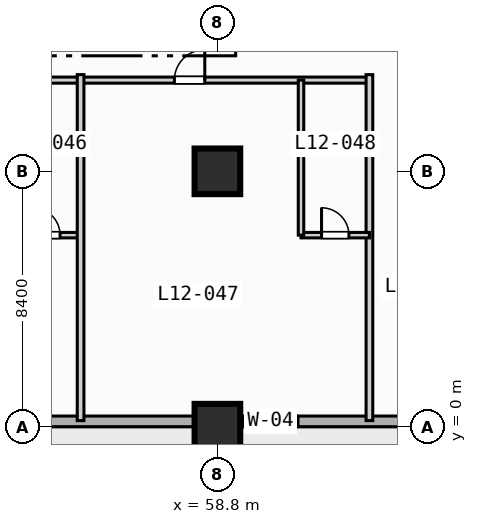
"""IFC4 building model, lengths in metres.
Left out: names, types, materials, properties, quantities, classifications, styles, units other than length and angle.
Written with IfcOpenShell. Run it as: python <this file> out.ifc"""

import sys

from ifc_helpers import new_model, si_unit, direction, frame, frame_2d, origin, origin_2d, place, context, subcontext, project, spatial, rectangle, extrude, element, fill, save


model = new_model("IFC4")
c1 = context("Model", 3, precision=1e-05, world=origin(), true_north=direction((0.0, 1.0)))
c2 = subcontext(c1, "Body", "Model", "MODEL_VIEW")
j1 = project(units=[si_unit("LENGTHUNIT", "METRE"), si_unit("PLANEANGLEUNIT", "RADIAN")], contexts=[c1])
p1 = place(None, origin())
s1 = spatial("IfcSite", under=j1, at=p1, CompositionType="ELEMENT")
p2 = place(p1, origin())
s2 = spatial("IfcBuilding", under=s1, at=p2, CompositionType="ELEMENT")
p3 = place(p2, frame((0.0, 0.0, 54.8)))
s3 = spatial("IfcBuildingStorey", under=s2, at=p3, CompositionType="ELEMENT", Elevation=54.8)
for number, where, z_axis, x_axis in (
    (1, (58.8, 0.0, 0.0), (0.0, 0.0, 1.0), (1.0, 0.0, 0.0)),
    (2, (58.8, 8.4, 0.0), (0.0, 0.0, 1.0), (1.0, 0.0, 0.0)),
):
    element("IfcColumn", number, at=place(p3, frame(where, z_axis=z_axis, x_axis=x_axis)), inside=s3, PredefinedType="COLUMN", context=c2, shape_type="SweptSolid", body=[
        extrude(rectangle(XDim=1.5, YDim=1.5, at=origin_2d()), origin(), (0.0, 0.0, 1.0), 3.8),
    ])
p4 = place(p3, frame((89.225, 0.175, 0.0), z_axis=(0.0, 0.0, 1.0), x_axis=(-1.0, 0.0, 0.0)))
e3 = element("IfcWall", 3, at=p4, inside=s3, PredefinedType="STANDARD", context=c2, shape_type="SweptSolid", body=[
    extrude(rectangle(XDim=86.05, YDim=0.35, at=frame_2d((43.025, 0.0))), origin(), (0.0, 0.0, 1.0), 3.55),
])
p5 = place(p4, frame((69.025, 0.0, 0.0)))
e4 = element("IfcOpeningElement", 4, at=p5, cuts=e3, PredefinedType="OPENING", context=c2, shape_type="SweptSolid", body=[
    extrude(rectangle(XDim=1.4, YDim=2.2, at=frame_2d((0.7, 1.1))), frame((0.0, 0.185, 0.0), z_axis=(0.0, -1.0, 0.0), x_axis=(1.0, 0.0, 0.0)), (0.0, 0.0, 1.0), 0.37),
])
p6 = place(p4, frame((58.725, 0.0, 0.85)))
e5 = element("IfcOpeningElement", 5, at=p6, cuts=e3, PredefinedType="OPENING", context=c2, shape_type="SweptSolid", body=[
    extrude(rectangle(XDim=2.2, YDim=1.8, at=frame_2d((1.1, 0.9))), frame((0.0, 0.185, 0.0), z_axis=(0.0, -1.0, 0.0), x_axis=(1.0, 0.0, 0.0)), (0.0, 0.0, 1.0), 0.37),
])
p7 = place(p4, frame((50.325, 0.0, 0.85)))
e6 = element("IfcOpeningElement", 6, at=p7, cuts=e3, PredefinedType="OPENING", context=c2, shape_type="SweptSolid", body=[
    extrude(rectangle(XDim=2.2, YDim=1.8, at=frame_2d((1.1, 0.9))), frame((0.0, 0.185, 0.0), z_axis=(0.0, -1.0, 0.0), x_axis=(1.0, 0.0, 0.0)), (0.0, 0.0, 1.0), 0.37),
])
p8 = place(p4, frame((41.925, 0.0, 0.85)))
e7 = element("IfcOpeningElement", 7, at=p8, cuts=e3, PredefinedType="OPENING", context=c2, shape_type="SweptSolid", body=[
    extrude(rectangle(XDim=2.2, YDim=1.8, at=frame_2d((1.1, 0.9))), frame((0.0, 0.185, 0.0), z_axis=(0.0, -1.0, 0.0), x_axis=(1.0, 0.0, 0.0)), (0.0, 0.0, 1.0), 0.37),
])
p9 = place(p4, frame((27.775, 0.0, 0.85)))
e8 = element("IfcOpeningElement", 8, at=p9, cuts=e3, PredefinedType="OPENING", context=c2, shape_type="SweptSolid", body=[
    extrude(rectangle(XDim=1.8, YDim=1.8, at=frame_2d((0.9, 0.9))), frame((0.0, 0.185, 0.0), z_axis=(0.0, -1.0, 0.0), x_axis=(1.0, 0.0, 0.0)), (0.0, 0.0, 1.0), 0.37),
])
p10 = place(p3, frame((13.5, 11.4, 0.0), z_axis=(0.0, 0.0, 1.0), x_axis=(1.0, 0.0, 0.0)))
e9 = element("IfcWall", 9, at=p10, inside=s3, PredefinedType="PARTITIONING", context=c2, shape_type="SweptSolid", body=[
    extrude(rectangle(XDim=50.3, YDim=0.2, at=frame_2d((25.15, 0.0))), origin(), (0.0, 0.0, 1.0), 3.55),
])
p11 = place(p10, frame((2.135, 0.0, 0.0)))
e10 = element("IfcOpeningElement", 10, at=p11, cuts=e9, PredefinedType="OPENING", context=c2, shape_type="SweptSolid", body=[
    extrude(rectangle(XDim=1.0, YDim=2.15, at=frame_2d((0.5, 1.075))), frame((0.0, 0.11, 0.0), z_axis=(0.0, -1.0, 0.0), x_axis=(1.0, 0.0, 0.0)), (0.0, 0.0, 1.0), 0.22),
])
p12 = place(p10, frame((14.665, 0.0, 0.0)))
e11 = element("IfcOpeningElement", 11, at=p12, cuts=e9, PredefinedType="OPENING", context=c2, shape_type="SweptSolid", body=[
    extrude(rectangle(XDim=1.0, YDim=2.15, at=frame_2d((0.5, 1.075))), frame((0.0, 0.11, 0.0), z_axis=(0.0, -1.0, 0.0), x_axis=(1.0, 0.0, 0.0)), (0.0, 0.0, 1.0), 0.22),
])
p13 = place(p10, frame((22.31, 0.0, 0.0)))
e12 = element("IfcOpeningElement", 12, at=p13, cuts=e9, PredefinedType="OPENING", context=c2, shape_type="SweptSolid", body=[
    extrude(rectangle(XDim=1.0, YDim=2.15, at=frame_2d((0.5, 1.075))), frame((0.0, 0.11, 0.0), z_axis=(0.0, -1.0, 0.0), x_axis=(1.0, 0.0, 0.0)), (0.0, 0.0, 1.0), 0.22),
])
p14 = place(p10, frame((32.51, 0.0, 0.0)))
e13 = element("IfcOpeningElement", 13, at=p14, cuts=e9, PredefinedType="OPENING", context=c2, shape_type="SweptSolid", body=[
    extrude(rectangle(XDim=1.0, YDim=2.15, at=frame_2d((0.5, 1.075))), frame((0.0, 0.11, 0.0), z_axis=(0.0, -1.0, 0.0), x_axis=(1.0, 0.0, 0.0)), (0.0, 0.0, 1.0), 0.22),
])
p15 = place(p10, frame((43.885, 0.0, 0.0)))
e14 = element("IfcOpeningElement", 14, at=p15, cuts=e9, PredefinedType="OPENING", context=c2, shape_type="SweptSolid", body=[
    extrude(rectangle(XDim=1.0, YDim=2.15, at=frame_2d((0.5, 1.075))), frame((0.0, 0.11, 0.0), z_axis=(0.0, -1.0, 0.0), x_axis=(1.0, 0.0, 0.0)), (0.0, 0.0, 1.0), 0.22),
])
p16 = place(p3, frame((52.05, 6.3, 0.0), z_axis=(0.0, 0.0, 1.0), x_axis=(1.0, 0.0, 0.0)))
e15 = element("IfcWall", 15, at=p16, inside=s3, PredefinedType="PLUMBINGWALL", context=c2, shape_type="SweptSolid", body=[
    extrude(rectangle(XDim=2.25, YDim=0.18, at=frame_2d((1.125, 0.0))), origin(), (0.0, 0.0, 1.0), 3.55),
])
p17 = place(p16, frame((0.675, 0.0, 0.0)))
e16 = element("IfcOpeningElement", 16, at=p17, cuts=e15, PredefinedType="OPENING", context=c2, shape_type="SweptSolid", body=[
    extrude(rectangle(XDim=0.9, YDim=2.1, at=frame_2d((0.45, 1.05))), frame((0.0, 0.1, 0.0), z_axis=(0.0, -1.0, 0.0), x_axis=(1.0, 0.0, 0.0)), (0.0, 0.0, 1.0), 0.2),
])
for number, where, z_axis, x_axis in (
    (17, (54.3, 0.2, 0.0), (0.0, 0.0, 1.0), (0.0, 1.0, 0.0)),
    (18, (63.8, 0.2, 0.0), (0.0, 0.0, 1.0), (0.0, 1.0, 0.0)),
):
    element("IfcWall", number, at=place(p3, frame(where, z_axis=z_axis, x_axis=x_axis)), inside=s3, PredefinedType="PARTITIONING", context=c2, shape_type="SweptSolid", body=[
        extrude(rectangle(XDim=11.38, YDim=0.22, at=frame_2d((5.69, 0.0))), origin(), (0.0, 0.0, 1.0), 3.55),
    ])
p18 = place(p3, frame((61.55, 6.3, 0.0), z_axis=(0.0, 0.0, 1.0), x_axis=(1.0, 0.0, 0.0)))
e19 = element("IfcWall", 19, at=p18, inside=s3, PredefinedType="PLUMBINGWALL", context=c2, shape_type="SweptSolid", body=[
    extrude(rectangle(XDim=2.25, YDim=0.18, at=frame_2d((1.125, 0.0))), origin(), (0.0, 0.0, 1.0), 3.55),
])
p19 = place(p18, frame((0.675, 0.0, 0.0)))
e20 = element("IfcOpeningElement", 20, at=p19, cuts=e19, PredefinedType="OPENING", context=c2, shape_type="SweptSolid", body=[
    extrude(rectangle(XDim=0.9, YDim=2.1, at=frame_2d((0.45, 1.05))), frame((0.0, 0.1, 0.0), z_axis=(0.0, -1.0, 0.0), x_axis=(1.0, 0.0, 0.0)), (0.0, 0.0, 1.0), 0.2),
])
p20 = place(p3, frame((61.55, 6.3, 0.0), z_axis=(0.0, 0.0, 1.0), x_axis=(0.0, 1.0, 0.0)))
e21 = element("IfcWall", 21, at=p20, inside=s3, PredefinedType="PLUMBINGWALL", context=c2, shape_type="SweptSolid", body=[
    extrude(rectangle(XDim=5.1, YDim=0.18, at=frame_2d((2.55, 0.0))), origin(), (0.0, 0.0, 1.0), 3.55),
])
p21 = place(p9, origin())
e22 = element("IfcWindow", 22, at=p21, inside=s3, PartitioningType="SINGLE_PANEL", PredefinedType="WINDOW", context=c2, shape_type="SweptSolid", body=[
    extrude(rectangle(XDim=1.8, YDim=1.8, at=frame_2d((0.9, 0.9))), frame((0.0, 0.03, 0.0), z_axis=(0.0, -1.0, 0.0), x_axis=(1.0, 0.0, 0.0)), (0.0, 0.0, 1.0), 0.06),
])
fill(e8, e22)
p22 = place(p15, origin())
e23 = element("IfcDoor", 23, at=p22, inside=s3, OperationType="SINGLE_SWING_RIGHT", PredefinedType="DOOR", context=c2, shape_type="SweptSolid", body=[
    extrude(rectangle(XDim=1.0, YDim=2.15, at=frame_2d((0.5, 1.075))), frame((0.0, 0.025, 0.0), z_axis=(0.0, -1.0, 0.0), x_axis=(1.0, 0.0, 0.0)), (0.0, 0.0, 1.0), 0.05),
])
fill(e14, e23)
p23 = place(p17, origin())
e24 = element("IfcDoor", 24, at=p23, inside=s3, OperationType="SINGLE_SWING_LEFT", PredefinedType="DOOR", context=c2, shape_type="SweptSolid", body=[
    extrude(rectangle(XDim=0.9, YDim=2.1, at=frame_2d((0.45, 1.05))), frame((0.0, 0.025, 0.0), z_axis=(0.0, -1.0, 0.0), x_axis=(1.0, 0.0, 0.0)), (0.0, 0.0, 1.0), 0.05),
])
fill(e16, e24)
p24 = place(p19, origin())
e25 = element("IfcDoor", 25, at=p24, inside=s3, OperationType="SINGLE_SWING_LEFT", PredefinedType="DOOR", context=c2, shape_type="SweptSolid", body=[
    extrude(rectangle(XDim=0.9, YDim=2.1, at=frame_2d((0.45, 1.05))), frame((0.0, 0.025, 0.0), z_axis=(0.0, -1.0, 0.0), x_axis=(1.0, 0.0, 0.0)), (0.0, 0.0, 1.0), 0.05),
])
fill(e20, e25)
save(model, sys.argv[1])
